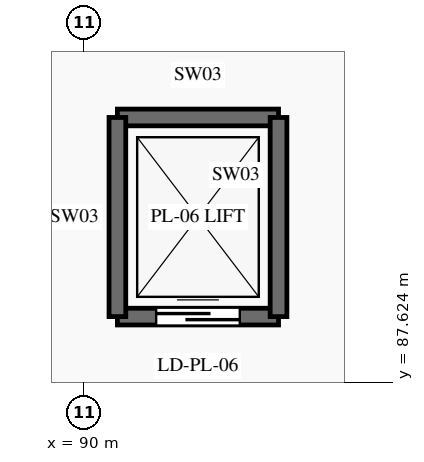
"""IFC4 building model, lengths in metres.
Left out: names, types, materials, properties, quantities, classifications, styles, units other than length and angle.
Written with IfcOpenShell. Run it as: python <this file> out.ifc"""

import sys

from ifc_helpers import new_model, si_unit, direction, frame, frame_2d, origin, place, context, subcontext, project, spatial, rectangle, extrude, element, fill, save


model = new_model("IFC4")
c1 = context("Model", 3, precision=1e-05, world=origin(), true_north=direction((0.0, 1.0)))
c2 = subcontext(c1, "Body", "Model", "MODEL_VIEW")
j1 = project(units=[si_unit("LENGTHUNIT", "METRE"), si_unit("PLANEANGLEUNIT", "RADIAN")], contexts=[c1])
p1 = place(None, origin())
s1 = spatial("IfcSite", under=j1, at=p1, CompositionType="ELEMENT")
p2 = place(p1, origin())
s2 = spatial("IfcBuilding", under=s1, at=p2, CompositionType="ELEMENT")
p3 = place(p2, frame((0.0, 0.0, -4.5)))
s3 = spatial("IfcBuildingStorey", under=s2, at=p3, CompositionType="ELEMENT", Elevation=-4.5)
p4 = place(p3, frame((90.44, 88.49, 0.0), z_axis=(0.0, 0.0, 1.0), x_axis=(1.0, 0.0, 0.0)))
e1 = element("IfcWall", 1, at=p4, inside=s3, PredefinedType="SHEAR", context=c2, shape_type="SweptSolid", body=[
    extrude(rectangle(XDim=2.12, YDim=0.22, at=frame_2d((1.06, 0.0))), origin(), (0.0, 0.0, 1.0), 4.5),
])
p5 = place(p4, frame((0.51, 0.0, 0.0)))
e2 = element("IfcOpeningElement", 2, at=p5, cuts=e1, PredefinedType="OPENING", context=c2, shape_type="SweptSolid", body=[
    extrude(rectangle(XDim=1.1, YDim=2.15, at=frame_2d((0.55, 1.075))), frame((0.0, 0.125, 0.0), z_axis=(0.0, -1.0, 0.0), x_axis=(1.0, 0.0, 0.0)), (0.0, 0.0, 1.0), 0.25),
])
p6 = place(p3, frame((90.44, 91.11, 0.0), z_axis=(0.0, 0.0, 1.0), x_axis=(1.0, 0.0, 0.0)))
e3 = element("IfcWall", 3, at=p6, inside=s3, PredefinedType="SHEAR", context=c2, shape_type="SweptSolid", body=[
    extrude(rectangle(XDim=2.12, YDim=0.22, at=frame_2d((1.06, 0.0))), origin(), (0.0, 0.0, 1.0), 4.5),
])
for number, where, z_axis, x_axis in (
    (4, (90.44, 88.49, 0.0), (0.0, 0.0, 1.0), (0.0, 1.0, 0.0)),
    (5, (92.56, 88.49, 0.0), (0.0, 0.0, 1.0), (0.0, 1.0, 0.0)),
):
    element("IfcWall", number, at=place(p3, frame(where, z_axis=z_axis, x_axis=x_axis)), inside=s3, PredefinedType="SHEAR", context=c2, shape_type="SweptSolid", body=[
        extrude(rectangle(XDim=2.62, YDim=0.22, at=frame_2d((1.31, 0.0))), origin(), (0.0, 0.0, 1.0), 4.5),
    ])
p7 = place(p5, origin())
e6 = element("IfcDoor", 6, at=p7, inside=s3, OperationType="SLIDING_TO_RIGHT", PredefinedType="DOOR", context=c2, shape_type="SweptSolid", body=[
    extrude(rectangle(XDim=1.1, YDim=2.15, at=frame_2d((0.55, 1.075))), frame((0.0, 0.025, 0.0), z_axis=(0.0, -1.0, 0.0), x_axis=(1.0, 0.0, 0.0)), (0.0, 0.0, 1.0), 0.05),
])
fill(e2, e6)
save(model, sys.argv[1])
